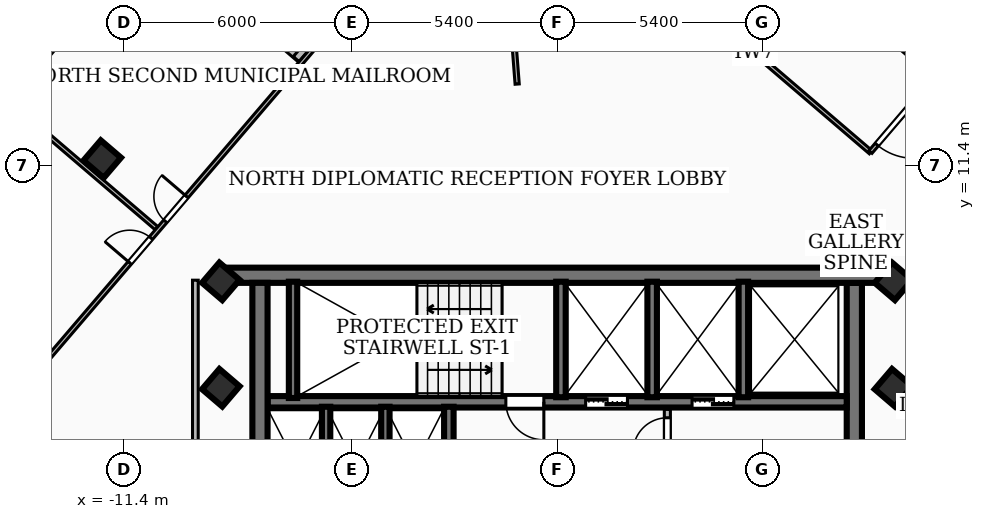
"""IFC4 building model, lengths in metres.
Left out: names, types, materials, properties, quantities, classifications, styles, units other than length and angle.
Written with IfcOpenShell. Run it as: python <this file> out.ifc"""

import sys

from ifc_helpers import new_model, si_unit, direction, frame, frame_2d, origin, origin_2d, place, context, subcontext, project, spatial, rectangle, extrude, element, fill, save


model = new_model("IFC4")
c1 = context("Model", 3, precision=1e-05, world=origin(), true_north=direction((0.0, 1.0)))
c2 = subcontext(c1, "Body", "Model", "MODEL_VIEW")
j1 = project(units=[si_unit("LENGTHUNIT", "METRE"), si_unit("PLANEANGLEUNIT", "RADIAN")], contexts=[c1])
p1 = place(None, origin())
s1 = spatial("IfcSite", under=j1, at=p1, CompositionType="ELEMENT")
p2 = place(p1, origin())
s2 = spatial("IfcBuilding", under=s1, at=p2, CompositionType="ELEMENT")
p3 = place(p2, frame((0.0, 0.0, 254.34)))
s3 = spatial("IfcBuildingStorey", under=s2, at=p3, CompositionType="ELEMENT", Elevation=254.34)
p4 = place(p3, frame((-8.78, 8.51, 0.0), z_axis=(0.0, 0.0, 1.0), x_axis=(1.0, 0.0, 0.0)))
e1 = element("IfcWall", 1, at=p4, inside=s3, PredefinedType="SHEAR", context=c2, shape_type="SweptSolid", body=[
    extrude(rectangle(XDim=17.56, YDim=0.4, at=frame_2d((8.78, 0.0))), origin(), (0.0, 0.0, 1.0), 3.16),
])
for number, where, z_axis, x_axis in (
    (2, (-7.82, 1.95, 0.0), (0.0, 0.0, 1.0), (0.0, 1.0, 0.0)),
    (3, (7.82, 8.31, 0.0), (0.0, 0.0, 1.0), (0.0, -1.0, 0.0)),
):
    element("IfcWall", number, at=place(p3, frame(where, z_axis=z_axis, x_axis=x_axis)), inside=s3, PredefinedType="SHEAR", context=c2, shape_type="SweptSolid", body=[
        extrude(rectangle(XDim=6.36, YDim=0.4, at=frame_2d((3.18, 0.0))), origin(), (0.0, 0.0, 1.0), 3.16),
    ])
p5 = place(p3, frame((7.62, 5.18, 0.0), z_axis=(0.0, 0.0, 1.0), x_axis=(-1.0, 0.0, 0.0)))
e4 = element("IfcWall", 4, at=p5, inside=s3, PredefinedType="SOLIDWALL", context=c2, shape_type="SweptSolid", body=[
    extrude(rectangle(XDim=15.24, YDim=0.3, at=frame_2d((7.62, 0.0))), origin(), (0.0, 0.0, 1.0), 3.16),
])
p6 = place(p5, frame((5.77, 0.0, 0.0)))
e5 = element("IfcOpeningElement", 5, at=p6, cuts=e4, PredefinedType="OPENING", context=c2, shape_type="SweptSolid", body=[
    extrude(rectangle(XDim=1.1, YDim=2.15, at=frame_2d((0.55, 1.075))), frame((0.0, 0.16, 0.0), z_axis=(0.0, -1.0, 0.0), x_axis=(1.0, 0.0, 0.0)), (0.0, 0.0, 1.0), 0.32),
])
p7 = place(p5, frame((2.97, 0.0, 0.0)))
e6 = element("IfcOpeningElement", 6, at=p7, cuts=e4, PredefinedType="OPENING", context=c2, shape_type="SweptSolid", body=[
    extrude(rectangle(XDim=1.1, YDim=2.15, at=frame_2d((0.55, 1.075))), frame((0.0, 0.16, 0.0), z_axis=(0.0, -1.0, 0.0), x_axis=(1.0, 0.0, 0.0)), (0.0, 0.0, 1.0), 0.32),
])
p8 = place(p5, frame((7.97, 0.0, 0.0)))
e7 = element("IfcOpeningElement", 7, at=p8, cuts=e4, PredefinedType="OPENING", context=c2, shape_type="SweptSolid", body=[
    extrude(rectangle(XDim=1.0, YDim=2.1, at=frame_2d((0.5, 1.05))), frame((0.0, 0.16, 0.0), z_axis=(0.0, -1.0, 0.0), x_axis=(1.0, 0.0, 0.0)), (0.0, 0.0, 1.0), 0.32),
])
p9 = place(p3, frame((-6.95, 5.28, 0.0), z_axis=(0.0, 0.0, 1.0), x_axis=(0.0, 1.0, 0.0)))
e8 = element("IfcWall", 8, at=p9, inside=s3, PredefinedType="SOLIDWALL", context=c2, shape_type="SweptSolid", body=[
    extrude(rectangle(XDim=3.06, YDim=0.22, at=frame_2d((1.53, 0.0))), origin(), (0.0, 0.0, 1.0), 3.16),
])
for number, where, z_axis, x_axis in (
    (9, (0.1, 5.3, 0.0), (0.0, 0.0, 1.0), (0.0, 1.0, 0.0)),
    (10, (2.5, 5.3, 0.0), (0.0, 0.0, 1.0), (0.0, 1.0, 0.0)),
    (11, (4.9, 5.3, 0.0), (0.0, 0.0, 1.0), (0.0, 1.0, 0.0)),
):
    element("IfcWall", number, at=place(p3, frame(where, z_axis=z_axis, x_axis=x_axis)), inside=s3, PredefinedType="SOLIDWALL", context=c2, shape_type="SweptSolid", body=[
        extrude(rectangle(XDim=3.04, YDim=0.25, at=frame_2d((1.52, 0.0))), origin(), (0.0, 0.0, 1.0), 3.16),
    ])
p10 = place(p3, frame((-2.85, 1.98, 0.0), z_axis=(0.0, 0.0, 1.0), x_axis=(0.0, 1.0, 0.0)))
e12 = element("IfcWall", 12, at=p10, inside=s3, PredefinedType="SOLIDWALL", context=c2, shape_type="SweptSolid", body=[
    extrude(rectangle(XDim=3.07, YDim=0.25, at=frame_2d((1.535, 0.0))), origin(), (0.0, 0.0, 1.0), 3.16),
])
for number, where, z_axis, x_axis in (
    (13, (-6.08, 1.98, 0.0), (0.0, 0.0, 1.0), (0.0, 1.0, 0.0)),
    (14, (-4.52, 1.98, 0.0), (0.0, 0.0, 1.0), (0.0, 1.0, 0.0)),
):
    element("IfcWall", number, at=place(p3, frame(where, z_axis=z_axis, x_axis=x_axis)), inside=s3, PredefinedType="SOLIDWALL", context=c2, shape_type="SweptSolid", body=[
        extrude(rectangle(XDim=3.07, YDim=0.22, at=frame_2d((1.535, 0.0))), origin(), (0.0, 0.0, 1.0), 3.16),
    ])
for number, where, z_axis, x_axis in (
    (15, (-8.85, 5.55, 0.0), (0.0, 0.0, 1.0), (0.65, 0.76, 0.0)),
    (16, (8.85, 5.55, 0.0), (0.0, 0.0, 1.0), (0.65, 0.76, 0.0)),
    (17, (-8.85, 8.35, 0.0), (0.0, 0.0, 1.0), (0.65, 0.76, 0.0)),
    (18, (8.85, 8.35, 0.0), (0.0, 0.0, 1.0), (0.65, 0.76, 0.0)),
    (19, (-11.971, 11.566, 0.0), (0.0, 0.0, 1.0), (0.65, 0.76, 0.0)),
):
    element("IfcColumn", number, at=place(p3, frame(where, z_axis=z_axis, x_axis=x_axis)), inside=s3, PredefinedType="COLUMN", context=c2, shape_type="SweptSolid", body=[
        extrude(rectangle(XDim=0.7, YDim=0.7, at=origin_2d()), origin(), (0.0, 0.0, 1.0), 3.42),
    ])
p11 = place(p3, frame((-9.522, 16.574, 0.0), z_axis=(0.0, 0.0, 1.0), x_axis=(0.759914066759, -0.650023546606, 0.0)))
e20 = element("IfcWall", 20, at=p11, inside=s3, PredefinedType="SOLIDWALL", context=c2, shape_type="SweptSolid", body=[
    extrude(rectangle(XDim=3.641, YDim=0.2, at=frame_2d((1.821, 0.0))), origin(), (0.0, 0.0, 1.0), 3.16),
])
p12 = place(p3, frame((-6.868, 14.198, 0.0), z_axis=(0.0, 0.0, 1.0), x_axis=(0.650240147413, 0.759728734939, 0.0)))
e21 = element("IfcWall", 21, at=p12, inside=s3, PredefinedType="SOLIDWALL", context=c2, shape_type="SweptSolid", body=[
    extrude(rectangle(XDim=6.64, YDim=0.2, at=frame_2d((3.32, 0.0))), origin(), (0.0, 0.0, 1.0), 3.16),
])
p13 = place(p3, frame((2.9, 2.04, 0.0), z_axis=(0.0, 0.0, 1.0), x_axis=(0.0, 1.0, 0.0)))
e22 = element("IfcWall", 22, at=p13, inside=s3, PredefinedType="PARTITIONING", context=c2, shape_type="SweptSolid", body=[
    extrude(rectangle(XDim=2.94, YDim=0.16, at=frame_2d((1.47, 0.0))), origin(), (0.0, 0.0, 1.0), 2.39),
])
p14 = place(p13, frame((1.82, 0.0, 0.0)))
e23 = element("IfcOpeningElement", 23, at=p14, cuts=e22, PredefinedType="OPENING", context=c2, shape_type="SweptSolid", body=[
    extrude(rectangle(XDim=0.9, YDim=2.06, at=frame_2d((0.45, 1.03))), frame((0.0, 0.09, 0.0), z_axis=(0.0, -1.0, 0.0), x_axis=(1.0, 0.0, 0.0)), (0.0, 0.0, 1.0), 0.18),
])
p15 = place(p3, frame((-9.52, 1.75, 0.0), z_axis=(0.0, 0.0, 1.0), x_axis=(0.0, 1.0, 0.0)))
e24 = element("IfcWall", 24, at=p15, inside=s3, PredefinedType="PARTITIONING", context=c2, shape_type="SweptSolid", body=[
    extrude(rectangle(XDim=6.63, YDim=0.15, at=frame_2d((3.315, 0.0))), origin(), (0.0, 0.0, 1.0), 2.53),
])
p16 = place(p3, frame((-1.052, 13.54, 0.0), z_axis=(0.0, 0.0, 1.0), x_axis=(-0.077356131702, 0.997003525013, 0.0)))
e25 = element("IfcWall", 25, at=p16, inside=s3, PredefinedType="PARTITIONING", context=c2, shape_type="SweptSolid", body=[
    extrude(rectangle(XDim=6.113, YDim=0.11, at=frame_2d((3.057, 0.0))), origin(), (0.0, 0.0, 1.0), 3.16),
])
p17 = place(p3, frame((8.251, 11.747, 0.0), z_axis=(0.0, 0.0, 1.0), x_axis=(-0.759658945325, 0.650321679469, 0.0)))
e26 = element("IfcWall", 26, at=p17, inside=s3, PredefinedType="PARTITIONING", context=c2, shape_type="SweptSolid", body=[
    extrude(rectangle(XDim=8.05, YDim=0.11, at=frame_2d((4.025, 0.0))), origin(), (0.0, 0.0, 1.0), 3.16),
])
p18 = place(p3, frame((9.941, 13.737, 0.0), z_axis=(0.0, 0.0, 1.0), x_axis=(-0.65016721503, -0.759791150581, 0.0)))
e27 = element("IfcWall", 27, at=p18, inside=s3, PredefinedType="PARTITIONING", context=c2, shape_type="SweptSolid", body=[
    extrude(rectangle(XDim=2.61, YDim=0.11, at=frame_2d((1.305, 0.0))), origin(), (0.0, 0.0, 1.0), 2.53),
])
p19 = place(p18, frame((0.855, 0.0, 0.0)))
e28 = element("IfcOpeningElement", 28, at=p19, cuts=e27, PredefinedType="OPENING", context=c2, shape_type="SweptSolid", body=[
    extrude(rectangle(XDim=1.5, YDim=2.12, at=frame_2d((0.75, 1.06))), frame((0.0, 0.065, 0.0), z_axis=(0.0, -1.0, 0.0), x_axis=(1.0, 0.0, 0.0)), (0.0, 0.0, 1.0), 0.13),
])
p20 = place(p3, frame((6.252, 16.894, 0.0), z_axis=(0.0, 0.0, 1.0), x_axis=(0.759715677597, -0.650255403063, 0.0)))
e29 = element("IfcWall", 29, at=p20, inside=s3, PredefinedType="PARTITIONING", context=c2, shape_type="SweptSolid", body=[
    extrude(rectangle(XDim=12.571, YDim=0.11, at=frame_2d((6.285, 0.0))), origin(), (0.0, 0.0, 1.0), 2.53),
])
p21 = place(p20, frame((6.655, 0.0, 0.0)))
e30 = element("IfcOpeningElement", 30, at=p21, cuts=e29, PredefinedType="OPENING", context=c2, shape_type="SweptSolid", body=[
    extrude(rectangle(XDim=0.86, YDim=2.04, at=frame_2d((0.43, 1.02))), frame((0.0, 0.065, 0.0), z_axis=(0.0, -1.0, 0.0), x_axis=(1.0, 0.0, 0.0)), (0.0, 0.0, 1.0), 0.13),
])
p22 = place(p20, frame((5.455, 0.0, 0.0)))
e31 = element("IfcOpeningElement", 31, at=p22, cuts=e29, PredefinedType="OPENING", context=c2, shape_type="SweptSolid", body=[
    extrude(rectangle(XDim=0.86, YDim=2.04, at=frame_2d((0.43, 1.02))), frame((0.0, 0.065, 0.0), z_axis=(0.0, -1.0, 0.0), x_axis=(1.0, 0.0, 0.0)), (0.0, 0.0, 1.0), 0.13),
])
p23 = place(p3, frame((-10.544, 9.749, 0.0), z_axis=(0.0, 0.0, 1.0), x_axis=(-0.759849347966, 0.650099198889, 0.0)))
e32 = element("IfcWall", 32, at=p23, inside=s3, PredefinedType="PARTITIONING", context=c2, shape_type="SweptSolid", body=[
    extrude(rectangle(XDim=5.085, YDim=0.11, at=frame_2d((2.542, 0.0))), origin(), (0.0, 0.0, 1.0), 3.16),
])
p24 = place(p3, frame((-17.437, 1.604, 0.0), z_axis=(0.0, 0.0, 1.0), x_axis=(0.650265099033, 0.759707378522, 0.0)))
e33 = element("IfcWall", 33, at=p24, inside=s3, PredefinedType="PARTITIONING", context=c2, shape_type="SweptSolid", body=[
    extrude(rectangle(XDim=20.139, YDim=0.11, at=frame_2d((10.07, 0.0))), origin(), (0.0, 0.0, 1.0), 2.53),
])
p25 = place(p24, frame((10.959, 0.0, 0.0)))
e34 = element("IfcOpeningElement", 34, at=p25, cuts=e33, PredefinedType="OPENING", context=c2, shape_type="SweptSolid", body=[
    extrude(rectangle(XDim=0.86, YDim=2.04, at=frame_2d((0.43, 1.02))), frame((0.0, 0.065, 0.0), z_axis=(0.0, -1.0, 0.0), x_axis=(1.0, 0.0, 0.0)), (0.0, 0.0, 1.0), 0.13),
])
p26 = place(p24, frame((9.519, 0.0, 0.0)))
e35 = element("IfcOpeningElement", 35, at=p26, cuts=e33, PredefinedType="OPENING", context=c2, shape_type="SweptSolid", body=[
    extrude(rectangle(XDim=0.86, YDim=2.04, at=frame_2d((0.43, 1.02))), frame((0.0, 0.065, 0.0), z_axis=(0.0, -1.0, 0.0), x_axis=(1.0, 0.0, 0.0)), (0.0, 0.0, 1.0), 0.13),
])
p27 = place(p6, origin())
e36 = element("IfcDoor", 36, at=p27, inside=s3, OperationType="DOUBLE_DOOR_SLIDING", PredefinedType="DOOR", context=c2, shape_type="SweptSolid", body=[
    extrude(rectangle(XDim=1.1, YDim=2.15, at=frame_2d((0.55, 1.075))), frame((0.0, 0.025, 0.0), z_axis=(0.0, -1.0, 0.0), x_axis=(1.0, 0.0, 0.0)), (0.0, 0.0, 1.0), 0.05),
])
fill(e5, e36)
p28 = place(p7, origin())
e37 = element("IfcDoor", 37, at=p28, inside=s3, OperationType="DOUBLE_DOOR_SLIDING", PredefinedType="DOOR", context=c2, shape_type="SweptSolid", body=[
    extrude(rectangle(XDim=1.1, YDim=2.15, at=frame_2d((0.55, 1.075))), frame((0.0, 0.025, 0.0), z_axis=(0.0, -1.0, 0.0), x_axis=(1.0, 0.0, 0.0)), (0.0, 0.0, 1.0), 0.05),
])
fill(e6, e37)
p29 = place(p8, origin())
e38 = element("IfcDoor", 38, at=p29, inside=s3, OperationType="SINGLE_SWING_LEFT", PredefinedType="DOOR", context=c2, shape_type="SweptSolid", body=[
    extrude(rectangle(XDim=1.0, YDim=2.1, at=frame_2d((0.5, 1.05))), frame((0.0, 0.025, 0.0), z_axis=(0.0, -1.0, 0.0), x_axis=(1.0, 0.0, 0.0)), (0.0, 0.0, 1.0), 0.05),
])
fill(e7, e38)
p30 = place(p14, origin())
e39 = element("IfcDoor", 39, at=p30, inside=s3, OperationType="SINGLE_SWING_LEFT", PredefinedType="DOOR", context=c2, shape_type="SweptSolid", body=[
    extrude(rectangle(XDim=0.9, YDim=2.06, at=frame_2d((0.45, 1.03))), frame((0.0, 0.025, 0.0), z_axis=(0.0, -1.0, 0.0), x_axis=(1.0, 0.0, 0.0)), (0.0, 0.0, 1.0), 0.05),
])
fill(e23, e39)
p31 = place(p19, origin())
e40 = element("IfcDoor", 40, at=p31, inside=s3, OperationType="SINGLE_SWING_LEFT", PredefinedType="DOOR", context=c2, shape_type="SweptSolid", body=[
    extrude(rectangle(XDim=1.5, YDim=2.12, at=frame_2d((0.75, 1.06))), frame((0.0, 0.025, 0.0), z_axis=(0.0, -1.0, 0.0), x_axis=(1.0, 0.0, 0.0)), (0.0, 0.0, 1.0), 0.05),
])
fill(e28, e40)
p32 = place(p25, origin())
e41 = element("IfcDoor", 41, at=p32, inside=s3, OperationType="SINGLE_SWING_RIGHT", PredefinedType="DOOR", context=c2, shape_type="SweptSolid", body=[
    extrude(rectangle(XDim=0.86, YDim=2.04, at=frame_2d((0.43, 1.02))), frame((0.0, 0.025, 0.0), z_axis=(0.0, -1.0, 0.0), x_axis=(1.0, 0.0, 0.0)), (0.0, 0.0, 1.0), 0.05),
])
fill(e34, e41)
p33 = place(p26, origin())
e42 = element("IfcDoor", 42, at=p33, inside=s3, OperationType="SINGLE_SWING_LEFT", PredefinedType="DOOR", context=c2, shape_type="SweptSolid", body=[
    extrude(rectangle(XDim=0.86, YDim=2.04, at=frame_2d((0.43, 1.02))), frame((0.0, 0.025, 0.0), z_axis=(0.0, -1.0, 0.0), x_axis=(1.0, 0.0, 0.0)), (0.0, 0.0, 1.0), 0.05),
])
fill(e35, e42)
save(model, sys.argv[1])
